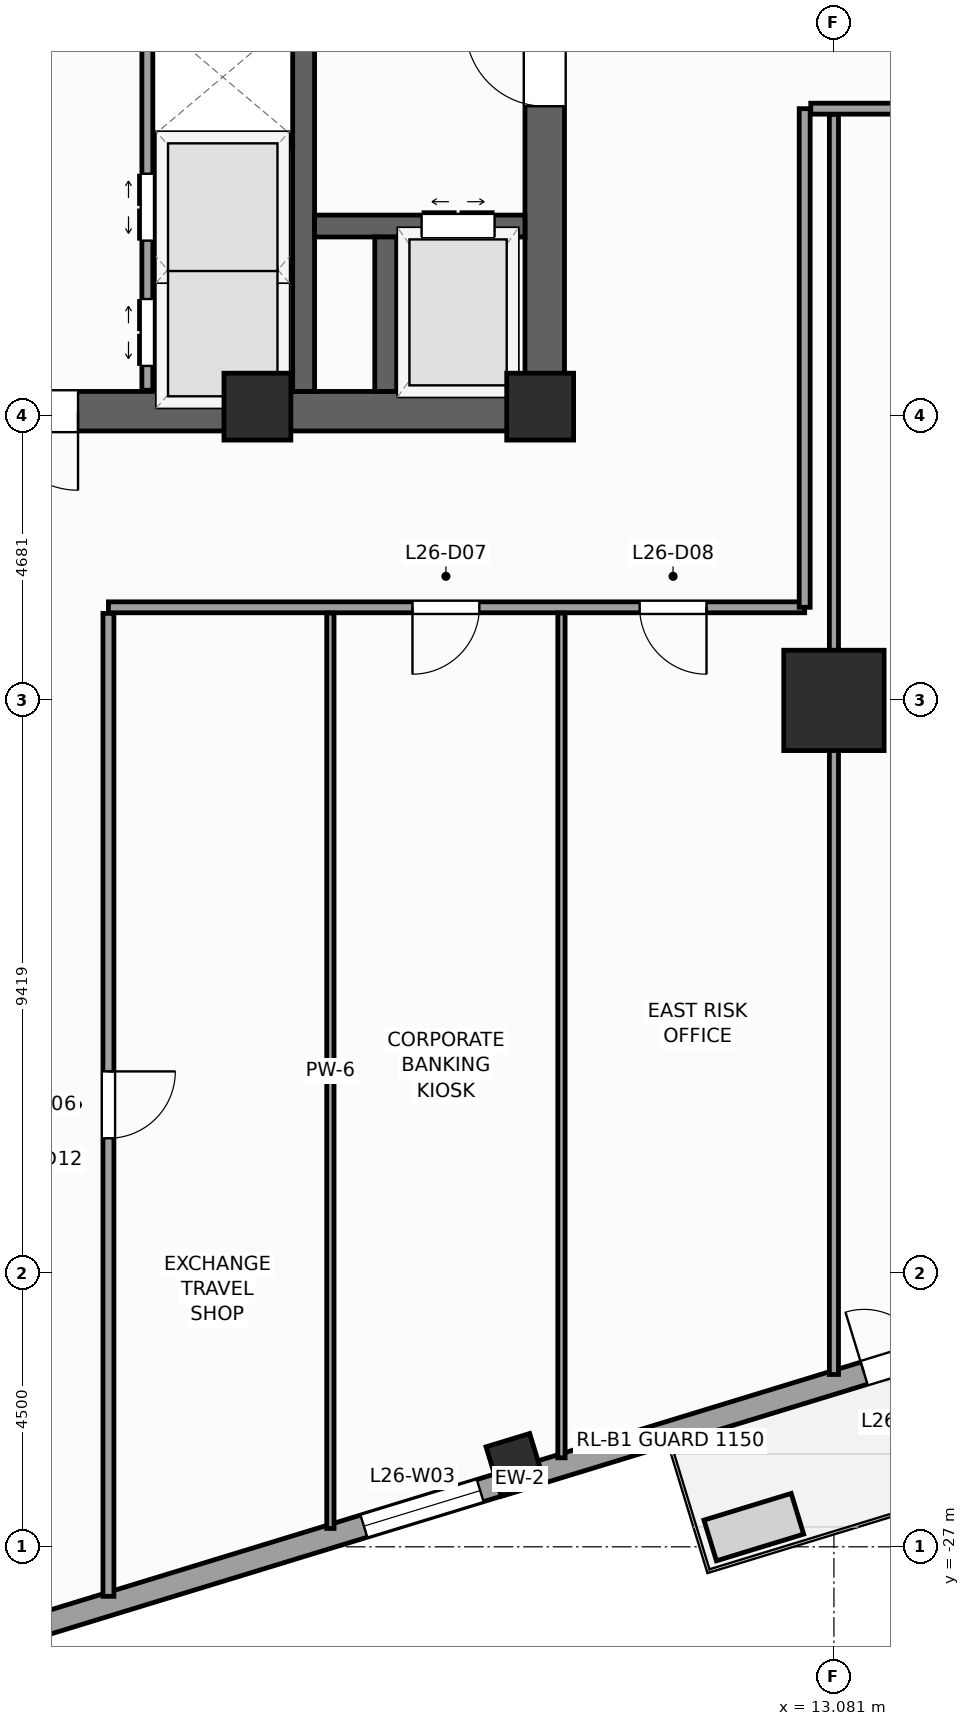
"""IFC4 building model, lengths in metres.
Left out: names, types, materials, properties, quantities, classifications, styles, units other than length and angle.
Written with IfcOpenShell. Run it as: python <this file> out.ifc"""

import sys

from ifc_helpers import new_model, si_unit, direction, frame, frame_2d, origin, origin_2d, place, context, subcontext, project, spatial, rectangle, extrude, source, transform, mapped, element, fill, save


model = new_model("IFC4")
c1 = context("Model", 3, precision=1e-05, world=origin(), true_north=direction((0.0, 1.0)))
c2 = subcontext(c1, "Body", "Model", "MODEL_VIEW")
j1 = project(units=[si_unit("LENGTHUNIT", "METRE"), si_unit("PLANEANGLEUNIT", "RADIAN")], contexts=[c1])
p1 = place(None, origin())
s1 = spatial("IfcSite", under=j1, at=p1, CompositionType="ELEMENT")
p2 = place(p1, origin())
s2 = spatial("IfcBuilding", under=s1, at=p2, CompositionType="ELEMENT")
p3 = place(p2, frame((0.0, 0.0, 111.2)))
s3 = spatial("IfcBuildingStorey", under=s2, at=p3, CompositionType="ELEMENT", Elevation=111.2)
p4 = place(p3, frame((-8.65, -8.325, 0.0), z_axis=(0.0, 0.0, 1.0), x_axis=(1.0, 0.0, 0.0)))
e1 = element("IfcWall", 1, at=p4, inside=s3, PredefinedType="SHEAR", context=c2, shape_type="SweptSolid", body=[
    extrude(rectangle(XDim=17.3, YDim=0.65, at=frame_2d((8.65, 0.0))), origin(), (0.0, 0.0, 1.0), 4.0),
])
p5 = place(p4, frame((8.0, 0.0, 0.0)))
e2 = element("IfcOpeningElement", 2, at=p5, cuts=e1, PredefinedType="OPENING", context=c2, shape_type="SweptSolid", body=[
    extrude(rectangle(XDim=1.3, YDim=2.2, at=frame_2d((0.65, 1.1))), frame((0.0, 0.335, 0.0), z_axis=(0.0, -1.0, 0.0), x_axis=(1.0, 0.0, 0.0)), (0.0, 0.0, 1.0), 0.67),
])
p6 = place(p3, frame((8.325, -8.0, 0.0), z_axis=(0.0, 0.0, 1.0), x_axis=(0.0, 1.0, 0.0)))
e3 = element("IfcWall", 3, at=p6, inside=s3, PredefinedType="SHEAR", context=c2, shape_type="SweptSolid", body=[
    extrude(rectangle(XDim=16.0, YDim=0.65, at=frame_2d((8.0, 0.0))), origin(), (0.0, 0.0, 1.0), 4.0),
])
p7 = place(p6, frame((4.69, 0.0, 0.0)))
e4 = element("IfcOpeningElement", 4, at=p7, cuts=e3, PredefinedType="OPENING", context=c2, shape_type="SweptSolid", body=[
    extrude(rectangle(XDim=1.3, YDim=2.2, at=frame_2d((0.65, 1.1))), frame((0.0, 0.335, 0.0), z_axis=(0.0, -1.0, 0.0), x_axis=(1.0, 0.0, 0.0)), (0.0, 0.0, 1.0), 0.67),
])
p8 = place(p3, frame((4.36, -8.0, 0.0), z_axis=(0.0, 0.0, 1.0), x_axis=(0.0, 1.0, 0.0)))
e5 = element("IfcWall", 5, at=p8, inside=s3, PredefinedType="SHEAR", context=c2, shape_type="SweptSolid", body=[
    extrude(rectangle(XDim=16.0, YDim=0.36, at=frame_2d((8.0, 0.0))), origin(), (0.0, 0.0, 1.0), 4.0),
])
p9 = place(p3, frame((4.54, -5.28, 0.0), z_axis=(0.0, 0.0, 1.0), x_axis=(1.0, 0.0, 0.0)))
e6 = element("IfcWall", 6, at=p9, inside=s3, PredefinedType="SHEAR", context=c2, shape_type="SweptSolid", body=[
    extrude(rectangle(XDim=3.46, YDim=0.36, at=frame_2d((1.73, 0.0))), origin(), (0.0, 0.0, 1.0), 4.0),
])
p10 = place(p9, frame((1.76, 0.0, 0.0)))
e7 = element("IfcOpeningElement", 7, at=p10, cuts=e6, PredefinedType="OPENING", context=c2, shape_type="SweptSolid", body=[
    extrude(rectangle(XDim=1.2, YDim=2.25, at=frame_2d((0.6, 1.125))), frame((0.0, 0.19, 0.0), z_axis=(0.0, -1.0, 0.0), x_axis=(1.0, 0.0, 0.0)), (0.0, 0.0, 1.0), 0.38),
])
p11 = place(p3, frame((5.71, -8.0, 0.0), z_axis=(0.0, 0.0, 1.0), x_axis=(0.0, 1.0, 0.0)))
e8 = element("IfcWall", 8, at=p11, inside=s3, PredefinedType="SHEAR", context=c2, shape_type="SweptSolid", body=[
    extrude(rectangle(XDim=2.54, YDim=0.36, at=frame_2d((1.27, 0.0))), origin(), (0.0, 0.0, 1.0), 4.0),
])
m1 = source(origin(), c2, "Body", "SweptSolid", [
    extrude(rectangle(XDim=1.1, YDim=1.1, at=origin_2d()), origin(), (0.0, 0.0, 1.0), 4.0),
])
for number, where, z_axis, x_axis in (
    (9, (8.25, -8.25, 0.0), (0.0, 0.0, 1.0), (1.0, 0.0, 0.0)),
    (10, (3.6, -8.25, 0.0), (0.0, 0.0, 1.0), (1.0, 0.0, 0.0)),
):
    element("IfcColumn", number, at=place(p3, frame(where, z_axis=z_axis, x_axis=x_axis)), inside=s3, PredefinedType="PILASTER", context=c2, shape_type="MappedRepresentation", body=[
        mapped(m1, transform((0.0, 0.0, 0.0), scale=1.0)),
    ])
m2 = source(origin(), c2, "Body", "SweptSolid", [
    extrude(rectangle(XDim=1.65, YDim=1.65, at=origin_2d()), origin(), (0.0, 0.0, 1.0), 4.0),
])
p12 = place(p3, frame((13.081, -13.081, 0.0), z_axis=(0.0, 0.0, 1.0), x_axis=(1.0, 0.0, 0.0)))
e11 = element("IfcColumn", 11, at=p12, inside=s3, PredefinedType="COLUMN", context=c2, shape_type="MappedRepresentation", body=[
    mapped(m2, transform((0.0, 0.0, 0.0), scale=1.0)),
])
m3 = source(origin(), c2, "Body", "SweptSolid", [
    extrude(rectangle(XDim=0.75, YDim=0.85, at=origin_2d()), origin(), (0.0, 0.0, 1.0), 4.0),
])
p13 = place(p3, frame((7.843, -25.653, 0.0), z_axis=(0.0, 0.0, 1.0), x_axis=(0.956304755963, 0.292371704723, 0.0)))
e12 = element("IfcColumn", 12, at=p13, inside=s3, PredefinedType="COLUMN", context=c2, shape_type="MappedRepresentation", body=[
    mapped(m3, transform((0.0, 0.0, 0.0), scale=1.0)),
])
p14 = place(p3, frame((-14.265, -32.658, 0.0), z_axis=(0.0, 0.0, 1.0), x_axis=(0.956304320851, 0.292373127906, 0.0)))
e13 = element("IfcWall", 13, at=p14, inside=s3, PredefinedType="STANDARD", context=c2, shape_type="SweptSolid", body=[
    extrude(rectangle(XDim=46.38, YDim=0.38, at=frame_2d((23.19, 0.0))), origin(), (0.0, 0.0, 1.0), 3.14),
])
p15 = place(p14, frame((29.115, 0.0, 0.0)))
e14 = element("IfcOpeningElement", 14, at=p15, cuts=e13, PredefinedType="OPENING", context=c2, shape_type="SweptSolid", body=[
    extrude(rectangle(XDim=1.05, YDim=2.25, at=frame_2d((0.525, 1.125))), frame((0.0, 0.2, 0.0), z_axis=(0.0, -1.0, 0.0), x_axis=(1.0, 0.0, 0.0)), (0.0, 0.0, 1.0), 0.4),
])
p16 = place(p14, frame((4.865, 0.0, 0.51)))
e15 = element("IfcOpeningElement", 15, at=p16, cuts=e13, PredefinedType="OPENING", context=c2, shape_type="SweptSolid", body=[
    extrude(rectangle(XDim=1.4, YDim=2.4, at=frame_2d((0.7, 1.2))), frame((0.0, 0.2, 0.0), z_axis=(0.0, -1.0, 0.0), x_axis=(1.0, 0.0, 0.0)), (0.0, 0.0, 1.0), 0.4),
])
p17 = place(p14, frame((10.95, 0.0, 0.51)))
e16 = element("IfcOpeningElement", 16, at=p17, cuts=e13, PredefinedType="OPENING", context=c2, shape_type="SweptSolid", body=[
    extrude(rectangle(XDim=2.0, YDim=2.4, at=frame_2d((1.0, 1.2))), frame((0.0, 0.2, 0.0), z_axis=(0.0, -1.0, 0.0), x_axis=(1.0, 0.0, 0.0)), (0.0, 0.0, 1.0), 0.4),
])
p18 = place(p14, frame((20.512, 0.0, 0.51)))
e17 = element("IfcOpeningElement", 17, at=p18, cuts=e13, PredefinedType="OPENING", context=c2, shape_type="SweptSolid", body=[
    extrude(rectangle(XDim=2.0, YDim=2.4, at=frame_2d((1.0, 1.2))), frame((0.0, 0.2, 0.0), z_axis=(0.0, -1.0, 0.0), x_axis=(1.0, 0.0, 0.0)), (0.0, 0.0, 1.0), 0.4),
])
p19 = place(p14, frame((31.288, 0.0, 0.51)))
e18 = element("IfcOpeningElement", 18, at=p19, cuts=e13, PredefinedType="OPENING", context=c2, shape_type="SweptSolid", body=[
    extrude(rectangle(XDim=2.0, YDim=2.4, at=frame_2d((1.0, 1.2))), frame((0.0, 0.2, 0.0), z_axis=(0.0, -1.0, 0.0), x_axis=(1.0, 0.0, 0.0)), (0.0, 0.0, 1.0), 0.4),
])
p20 = place(p14, frame((39.187, 0.0, 0.51)))
e19 = element("IfcOpeningElement", 19, at=p20, cuts=e13, PredefinedType="OPENING", context=c2, shape_type="SweptSolid", body=[
    extrude(rectangle(XDim=1.4, YDim=2.4, at=frame_2d((0.7, 1.2))), frame((0.0, 0.2, 0.0), z_axis=(0.0, -1.0, 0.0), x_axis=(1.0, 0.0, 0.0)), (0.0, 0.0, 1.0), 0.4),
])
p21 = place(p3, frame((1.79, -7.98, 0.0), z_axis=(0.0, 0.0, 1.0), x_axis=(0.0, 1.0, 0.0)))
e20 = element("IfcWall", 20, at=p21, inside=s3, PredefinedType="PARTITIONING", context=c2, shape_type="SweptSolid", body=[
    extrude(rectangle(XDim=12.38, YDim=0.18, at=frame_2d((6.19, 0.0))), origin(), (0.0, 0.0, 1.0), 3.74),
])
p22 = place(p21, frame((0.4, 0.0, 0.0)))
e21 = element("IfcOpeningElement", 21, at=p22, cuts=e20, PredefinedType="OPENING", context=c2, shape_type="SweptSolid", body=[
    extrude(rectangle(XDim=1.1, YDim=2.2, at=frame_2d((0.55, 1.1))), frame((0.0, 0.1, 0.0), z_axis=(0.0, -1.0, 0.0), x_axis=(1.0, 0.0, 0.0)), (0.0, 0.0, 1.0), 0.2),
])
p23 = place(p21, frame((2.46, 0.0, 0.0)))
e22 = element("IfcOpeningElement", 22, at=p23, cuts=e20, PredefinedType="OPENING", context=c2, shape_type="SweptSolid", body=[
    extrude(rectangle(XDim=1.1, YDim=2.2, at=frame_2d((0.55, 1.1))), frame((0.0, 0.1, 0.0), z_axis=(0.0, -1.0, 0.0), x_axis=(1.0, 0.0, 0.0)), (0.0, 0.0, 1.0), 0.2),
])
p24 = place(p3, frame((1.89, -3.9, 0.0), z_axis=(0.0, 0.0, 1.0), x_axis=(1.0, 0.0, 0.0)))
e23 = element("IfcWall", 23, at=p24, inside=s3, PredefinedType="PARTITIONING", context=c2, shape_type="SweptSolid", body=[
    extrude(rectangle(XDim=2.28, YDim=0.18, at=frame_2d((1.14, 0.0))), origin(), (0.0, 0.0, 1.0), 3.74),
])
p25 = place(p3, frame((1.9, -6.0, 0.0), z_axis=(0.0, 0.0, 1.0), x_axis=(1.0, 0.0, 0.0)))
e24 = element("IfcWall", 24, at=p25, inside=s3, PredefinedType="PARTITIONING", context=c2, shape_type="SweptSolid", body=[
    extrude(rectangle(XDim=2.26, YDim=0.12, at=frame_2d((1.13, 0.0))), origin(), (0.0, 0.0, 1.0), 3.74),
])
p26 = place(p3, frame((1.15, -11.55, 0.0), z_axis=(0.0, 0.0, 1.0), x_axis=(1.0, 0.0, 0.0)))
e25 = element("IfcWall", 25, at=p26, inside=s3, PredefinedType="PARTITIONING", context=c2, shape_type="SweptSolid", body=[
    extrude(rectangle(XDim=11.45, YDim=0.18, at=frame_2d((5.725, 0.0))), origin(), (0.0, 0.0, 1.0), 3.74),
])
p27 = place(p26, frame((5.0, 0.0, 0.0)))
e26 = element("IfcOpeningElement", 26, at=p27, cuts=e25, PredefinedType="OPENING", context=c2, shape_type="SweptSolid", body=[
    extrude(rectangle(XDim=1.1, YDim=2.2, at=frame_2d((0.55, 1.1))), frame((0.0, 0.1, 0.0), z_axis=(0.0, -1.0, 0.0), x_axis=(1.0, 0.0, 0.0)), (0.0, 0.0, 1.0), 0.2),
])
p28 = place(p26, frame((8.736, 0.0, 0.0)))
e27 = element("IfcOpeningElement", 27, at=p28, cuts=e25, PredefinedType="OPENING", context=c2, shape_type="SweptSolid", body=[
    extrude(rectangle(XDim=1.1, YDim=2.2, at=frame_2d((0.55, 1.1))), frame((0.0, 0.1, 0.0), z_axis=(0.0, -1.0, 0.0), x_axis=(1.0, 0.0, 0.0)), (0.0, 0.0, 1.0), 0.2),
])
p29 = place(p3, frame((12.6, -11.55, 0.0), z_axis=(0.0, 0.0, 1.0), x_axis=(0.0, 1.0, 0.0)))
e28 = element("IfcWall", 28, at=p29, inside=s3, PredefinedType="PARTITIONING", context=c2, shape_type="SweptSolid", body=[
    extrude(rectangle(XDim=8.2, YDim=0.18, at=frame_2d((4.1, 0.0))), origin(), (0.0, 0.0, 1.0), 3.74),
])
p30 = place(p3, frame((12.7, -3.35, 0.0), z_axis=(0.0, 0.0, 1.0), x_axis=(1.0, 0.0, 0.0)))
e29 = element("IfcWall", 29, at=p30, inside=s3, PredefinedType="PARTITIONING", context=c2, shape_type="SweptSolid", body=[
    extrude(rectangle(XDim=16.49, YDim=0.18, at=frame_2d((8.245, 0.0))), origin(), (0.0, 0.0, 1.0), 3.74),
])
p31 = place(p30, frame((7.721, 0.0, 0.0)))
e30 = element("IfcOpeningElement", 30, at=p31, cuts=e29, PredefinedType="OPENING", context=c2, shape_type="SweptSolid", body=[
    extrude(rectangle(XDim=1.1, YDim=2.2, at=frame_2d((0.55, 1.1))), frame((0.0, 0.1, 0.0), z_axis=(0.0, -1.0, 0.0), x_axis=(1.0, 0.0, 0.0)), (0.0, 0.0, 1.0), 0.2),
])
p32 = place(p3, frame((1.15, -27.814, 0.0), z_axis=(0.0, 0.0, 1.0), x_axis=(0.0, 1.0, 0.0)))
e31 = element("IfcWall", 31, at=p32, inside=s3, PredefinedType="PARTITIONING", context=c2, shape_type="SweptSolid", body=[
    extrude(rectangle(XDim=16.164, YDim=0.18, at=frame_2d((8.082, 0.0))), origin(), (0.0, 0.0, 1.0), 3.41),
])
p33 = place(p32, frame((7.532, 0.0, 0.0)))
e32 = element("IfcOpeningElement", 32, at=p33, cuts=e31, PredefinedType="OPENING", context=c2, shape_type="SweptSolid", body=[
    extrude(rectangle(XDim=1.1, YDim=2.2, at=frame_2d((0.55, 1.1))), frame((0.0, 0.1, 0.0), z_axis=(0.0, -1.0, 0.0), x_axis=(1.0, 0.0, 0.0)), (0.0, 0.0, 1.0), 0.2),
])
p34 = place(p3, frame((4.8, -26.698, 0.0), z_axis=(0.0, 0.0, 1.0), x_axis=(0.0, 1.0, 0.0)))
e33 = element("IfcWall", 33, at=p34, inside=s3, PredefinedType="PARTITIONING", context=c2, shape_type="SweptSolid", body=[
    extrude(rectangle(XDim=15.053, YDim=0.12, at=frame_2d((7.527, 0.0))), origin(), (0.0, 0.0, 1.0), 3.41),
])
p35 = place(p3, frame((8.6, -25.536, 0.0), z_axis=(0.0, 0.0, 1.0), x_axis=(0.0, 1.0, 0.0)))
e34 = element("IfcWall", 34, at=p35, inside=s3, PredefinedType="PARTITIONING", context=c2, shape_type="SweptSolid", body=[
    extrude(rectangle(XDim=13.891, YDim=0.12, at=frame_2d((6.946, 0.0))), origin(), (0.0, 0.0, 1.0), 3.04),
])
p36 = place(p3, frame((13.081, -24.167, 0.0), z_axis=(0.0, 0.0, 1.0), x_axis=(0.0, 1.0, 0.0)))
e35 = element("IfcWall", 35, at=p36, inside=s3, PredefinedType="PARTITIONING", context=c2, shape_type="SweptSolid", body=[
    extrude(rectangle(XDim=20.721, YDim=0.15, at=frame_2d((10.361, 0.0))), origin(), (0.0, 0.0, 1.0), 2.732),
])
m4 = source(origin(), c2, "Body", "SweptSolid", [
    extrude(rectangle(XDim=1.05, YDim=2.25, at=frame_2d((0.525, 1.125))), frame((0.0, 0.025, 0.0), z_axis=(0.0, -1.0, 0.0), x_axis=(1.0, 0.0, 0.0)), (0.0, 0.0, 1.0), 0.05),
])
p37 = place(p15, origin())
e36 = element("IfcDoor", 36, at=p37, inside=s3, OperationType="SINGLE_SWING_LEFT", PredefinedType="DOOR", context=c2, shape_type="MappedRepresentation", body=[
    mapped(m4, transform((0.0, 0.0, 0.0), scale=1.0)),
])
fill(e14, e36)
m5 = source(origin(), c2, "Body", "SweptSolid", [
    extrude(rectangle(XDim=2.0, YDim=2.4, at=frame_2d((1.0, 1.2))), frame((0.0, 0.03, 0.0), z_axis=(0.0, -1.0, 0.0), x_axis=(1.0, 0.0, 0.0)), (0.0, 0.0, 1.0), 0.06),
])
p38 = place(p18, origin())
e37 = element("IfcWindow", 37, at=p38, inside=s3, PartitioningType="SINGLE_PANEL", PredefinedType="WINDOW", context=c2, shape_type="MappedRepresentation", body=[
    mapped(m5, transform((0.0, 0.0, 0.0), scale=1.0)),
])
fill(e17, e37)
m6 = source(origin(), c2, "Body", "SweptSolid", [
    extrude(rectangle(XDim=1.3, YDim=2.2, at=frame_2d((0.65, 1.1))), frame((0.0, 0.025, 0.0), z_axis=(0.0, -1.0, 0.0), x_axis=(1.0, 0.0, 0.0)), (0.0, 0.0, 1.0), 0.05),
])
p39 = place(p7, origin())
e38 = element("IfcDoor", 38, at=p39, inside=s3, OperationType="SINGLE_SWING_RIGHT", PredefinedType="DOOR", context=c2, shape_type="MappedRepresentation", body=[
    mapped(m6, transform((0.0, 0.0, 0.0), scale=1.0)),
])
fill(e4, e38)
p40 = place(p5, frame((1.3, 0.0, 0.0), z_axis=(0.0, 0.0, 1.0), x_axis=(-1.0, 0.0, 0.0)))
e39 = element("IfcDoor", 39, at=p40, inside=s3, OperationType="SINGLE_SWING_RIGHT", PredefinedType="DOOR", context=c2, shape_type="MappedRepresentation", body=[
    mapped(m6, transform((0.0, 0.0, 0.0), scale=1.0)),
])
fill(e2, e39)
m7 = source(origin(), c2, "Body", "SweptSolid", [
    extrude(rectangle(XDim=1.2, YDim=2.25, at=frame_2d((0.6, 1.125))), frame((0.0, 0.025, 0.0), z_axis=(0.0, -1.0, 0.0), x_axis=(1.0, 0.0, 0.0)), (0.0, 0.0, 1.0), 0.05),
])
p41 = place(p10, origin())
e40 = element("IfcDoor", 40, at=p41, inside=s3, OperationType="DOUBLE_DOOR_SLIDING", PredefinedType="DOOR", context=c2, shape_type="MappedRepresentation", body=[
    mapped(m7, transform((0.0, 0.0, 0.0), scale=1.0)),
])
fill(e7, e40)
m8 = source(origin(), c2, "Body", "SweptSolid", [
    extrude(rectangle(XDim=1.1, YDim=2.2, at=frame_2d((0.55, 1.1))), frame((0.0, 0.025, 0.0), z_axis=(0.0, -1.0, 0.0), x_axis=(1.0, 0.0, 0.0)), (0.0, 0.0, 1.0), 0.05),
])
p42 = place(p22, origin())
e41 = element("IfcDoor", 41, at=p42, inside=s3, OperationType="DOUBLE_DOOR_SLIDING", PredefinedType="DOOR", context=c2, shape_type="MappedRepresentation", body=[
    mapped(m8, transform((0.0, 0.0, 0.0), scale=1.0)),
])
fill(e21, e41)
p43 = place(p23, origin())
e42 = element("IfcDoor", 42, at=p43, inside=s3, OperationType="DOUBLE_DOOR_SLIDING", PredefinedType="DOOR", context=c2, shape_type="MappedRepresentation", body=[
    mapped(m8, transform((0.0, 0.0, 0.0), scale=1.0)),
])
fill(e22, e42)
p44 = place(p33, frame((1.1, 0.0, 0.0), z_axis=(0.0, 0.0, 1.0), x_axis=(-1.0, 0.0, 0.0)))
e43 = element("IfcDoor", 43, at=p44, inside=s3, OperationType="SINGLE_SWING_RIGHT", PredefinedType="DOOR", context=c2, shape_type="MappedRepresentation", body=[
    mapped(m8, transform((0.0, 0.0, 0.0), scale=1.0)),
])
fill(e32, e43)
p45 = place(p27, frame((1.1, 0.0, 0.0), z_axis=(0.0, 0.0, 1.0), x_axis=(-1.0, 0.0, 0.0)))
e44 = element("IfcDoor", 44, at=p45, inside=s3, OperationType="SINGLE_SWING_LEFT", PredefinedType="DOOR", context=c2, shape_type="MappedRepresentation", body=[
    mapped(m8, transform((0.0, 0.0, 0.0), scale=1.0)),
])
fill(e26, e44)
p46 = place(p28, frame((1.1, 0.0, 0.0), z_axis=(0.0, 0.0, 1.0), x_axis=(-1.0, 0.0, 0.0)))
e45 = element("IfcDoor", 45, at=p46, inside=s3, OperationType="SINGLE_SWING_RIGHT", PredefinedType="DOOR", context=c2, shape_type="MappedRepresentation", body=[
    mapped(m8, transform((0.0, 0.0, 0.0), scale=1.0)),
])
fill(e27, e45)
save(model, sys.argv[1])
